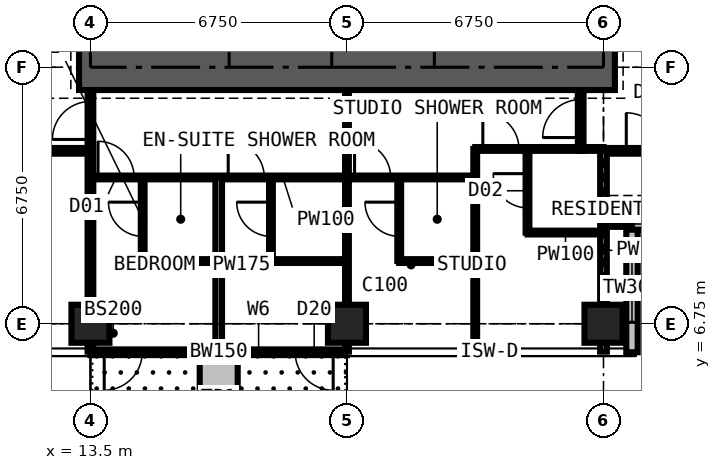
"""IFC4 building model, lengths in metres.
Left out: names, types, materials, properties, quantities, classifications, styles, units other than length and angle.
Written with IfcOpenShell. Run it as: python <this file> out.ifc"""

import sys

from ifc_helpers import new_model, si_unit, direction, frame, frame_2d, origin, origin_2d, place, context, subcontext, project, spatial, rectangle, extrude, element, fill, save


model = new_model("IFC4")
c1 = context("Model", 3, precision=1e-05, world=origin(), true_north=direction((0.0, 1.0)))
c2 = subcontext(c1, "Body", "Model", "MODEL_VIEW")
j1 = project(units=[si_unit("LENGTHUNIT", "METRE"), si_unit("PLANEANGLEUNIT", "RADIAN")], contexts=[c1])
p1 = place(None, origin())
s1 = spatial("IfcSite", under=j1, at=p1, CompositionType="ELEMENT")
p2 = place(p1, origin())
s2 = spatial("IfcBuilding", under=s1, at=p2, CompositionType="ELEMENT")
p3 = place(p2, frame((0.0, 0.0, 247.5)))
s3 = spatial("IfcBuildingStorey", under=s2, at=p3, CompositionType="ELEMENT", Elevation=247.5)
for number, where, z_axis, x_axis in (
    (1, (13.5, 6.75, 0.0), (0.0, 0.0, 1.0), (1.0, 0.0, 0.0)),
    (2, (20.25, 6.75, 0.0), (0.0, 0.0, 1.0), (1.0, 0.0, 0.0)),
    (3, (27.0, 6.75, 0.0), (0.0, 0.0, 1.0), (1.0, 0.0, 0.0)),
):
    element("IfcColumn", number, at=place(p3, frame(where, z_axis=z_axis, x_axis=x_axis)), inside=s3, PredefinedType="COLUMN", context=c2, shape_type="SweptSolid", body=[
        extrude(rectangle(XDim=1.0, YDim=1.0, at=origin_2d()), origin(), (0.0, 0.0, 1.0), 3.6),
    ])
p4 = place(p3, frame((13.2, 13.5, 0.0), z_axis=(0.0, 0.0, 1.0), x_axis=(1.0, 0.0, 0.0)))
e4 = element("IfcWall", 4, at=p4, inside=s3, PredefinedType="SHEAR", context=c2, shape_type="SweptSolid", body=[
    extrude(rectangle(XDim=14.1, YDim=1.2, at=frame_2d((7.05, 0.0))), origin(), (0.0, 0.0, 1.0), 3.6),
])
p5 = place(p3, frame((20.25, 6.0, 0.0), z_axis=(0.0, 0.0, 1.0), x_axis=(-1.0, 0.0, 0.0)))
e5 = element("IfcWall", 5, at=p5, inside=s3, PredefinedType="SOLIDWALL", context=c2, shape_type="SweptSolid", body=[
    extrude(rectangle(XDim=6.75, YDim=0.15, at=frame_2d((3.375, 0.0))), origin(), (0.0, 0.0, 1.0), 3.375),
])
p6 = place(p5, frame((0.363, 0.0, 0.0)))
e6 = element("IfcOpeningElement", 6, at=p6, cuts=e5, PredefinedType="OPENING", context=c2, shape_type="SweptSolid", body=[
    extrude(rectangle(XDim=1.0, YDim=2.2, at=frame_2d((0.5, 1.1))), frame((0.0, 0.085, 0.0), z_axis=(0.0, -1.0, 0.0), x_axis=(1.0, 0.0, 0.0)), (0.0, 0.0, 1.0), 0.17),
])
p7 = place(p5, frame((1.725, 0.0, 0.9)))
e7 = element("IfcOpeningElement", 7, at=p7, cuts=e5, PredefinedType="OPENING", context=c2, shape_type="SweptSolid", body=[
    extrude(rectangle(XDim=1.2, YDim=1.8, at=frame_2d((0.6, 0.9))), frame((0.0, 0.085, 0.0), z_axis=(0.0, -1.0, 0.0), x_axis=(1.0, 0.0, 0.0)), (0.0, 0.0, 1.0), 0.17),
])
p8 = place(p5, frame((5.387, 0.0, 0.0)))
e8 = element("IfcOpeningElement", 8, at=p8, cuts=e5, PredefinedType="OPENING", context=c2, shape_type="SweptSolid", body=[
    extrude(rectangle(XDim=1.0, YDim=2.2, at=frame_2d((0.5, 1.1))), frame((0.0, 0.085, 0.0), z_axis=(0.0, -1.0, 0.0), x_axis=(1.0, 0.0, 0.0)), (0.0, 0.0, 1.0), 0.17),
])
p9 = place(p5, frame((3.825, 0.0, 0.9)))
e9 = element("IfcOpeningElement", 9, at=p9, cuts=e5, PredefinedType="OPENING", context=c2, shape_type="SweptSolid", body=[
    extrude(rectangle(XDim=1.2, YDim=1.8, at=frame_2d((0.6, 0.9))), frame((0.0, 0.085, 0.0), z_axis=(0.0, -1.0, 0.0), x_axis=(1.0, 0.0, 0.0)), (0.0, 0.0, 1.0), 0.17),
])
p10 = place(p3, frame((27.75, 6.0, 0.0), z_axis=(0.0, 0.0, 1.0), x_axis=(0.0, 1.0, 0.0)))
e10 = element("IfcWall", 10, at=p10, inside=s3, PredefinedType="SOLIDWALL", context=c2, shape_type="SweptSolid", body=[
    extrude(rectangle(XDim=3.375, YDim=0.3, at=frame_2d((1.688, 0.0))), origin(), (0.0, 0.0, 1.0), 3.375),
])
p11 = place(p10, frame((0.788, 0.0, 0.6)))
e11 = element("IfcOpeningElement", 11, at=p11, cuts=e10, PredefinedType="OPENING", context=c2, shape_type="SweptSolid", body=[
    extrude(rectangle(XDim=1.8, YDim=2.1, at=frame_2d((0.9, 1.05))), frame((0.0, 0.16, 0.0), z_axis=(0.0, -1.0, 0.0), x_axis=(1.0, 0.0, 0.0)), (0.0, 0.0, 1.0), 0.32),
])
p12 = place(p3, frame((27.75, 9.375, 0.0), z_axis=(0.0, 0.0, 1.0), x_axis=(1.0, 0.0, 0.0)))
e12 = element("IfcWall", 12, at=p12, inside=s3, PredefinedType="SOLIDWALL", context=c2, shape_type="SweptSolid", body=[
    extrude(rectangle(XDim=3.375, YDim=0.3, at=frame_2d((1.688, 0.0))), origin(), (0.0, 0.0, 1.0), 3.375),
])
p13 = place(p12, frame((0.788, 0.0, 0.6)))
e13 = element("IfcOpeningElement", 13, at=p13, cuts=e12, PredefinedType="OPENING", context=c2, shape_type="SweptSolid", body=[
    extrude(rectangle(XDim=1.8, YDim=2.1, at=frame_2d((0.9, 1.05))), frame((0.0, 0.16, 0.0), z_axis=(0.0, -1.0, 0.0), x_axis=(1.0, 0.0, 0.0)), (0.0, 0.0, 1.0), 0.32),
])
p14 = place(p3, frame((16.875, 5.9, 0.0), z_axis=(0.0, 0.0, 1.0), x_axis=(0.0, -1.0, 0.0)))
e14 = element("IfcWall", 14, at=p14, inside=s3, PredefinedType="USERDEFINED", context=c2, shape_type="SweptSolid", body=[
    extrude(rectangle(XDim=2.2, YDim=1.0, at=frame_2d((1.1, 0.0))), origin(), (0.0, 0.0, 1.0), 0.9),
])
p15 = place(p3, frame((10.125, 11.3, 0.0), z_axis=(0.0, 0.0, 1.0), x_axis=(1.0, 0.0, 0.0)))
e15 = element("IfcWall", 15, at=p15, inside=s3, PredefinedType="PARTITIONING", context=c2, shape_type="SweptSolid", body=[
    extrude(rectangle(XDim=3.375, YDim=0.15, at=frame_2d((1.688, 0.0))), origin(), (0.0, 0.0, 1.0), 3.375),
])
p16 = place(p3, frame((13.5, 6.016, 0.0), z_axis=(0.0, 0.0, 1.0), x_axis=(0.0, 1.0, 0.0)))
e16 = element("IfcWall", 16, at=p16, inside=s3, PredefinedType="PARTITIONING", context=c2, shape_type="SweptSolid", body=[
    extrude(rectangle(XDim=6.884, YDim=0.15, at=frame_2d((3.442, 0.0))), origin(), (0.0, 0.0, 1.0), 2.61),
])
p17 = place(p16, frame((5.584, 0.0, 0.0)))
e17 = element("IfcOpeningElement", 17, at=p17, cuts=e16, PredefinedType="OPENING", context=c2, shape_type="SweptSolid", body=[
    extrude(rectangle(XDim=1.0, YDim=2.2, at=frame_2d((0.5, 1.1))), frame((0.0, 0.085, 0.0), z_axis=(0.0, -1.0, 0.0), x_axis=(1.0, 0.0, 0.0)), (0.0, 0.0, 1.0), 0.17),
])
p18 = place(p3, frame((13.5, 10.6, 0.0), z_axis=(0.0, 0.0, 1.0), x_axis=(1.0, 0.0, 0.0)))
e18 = element("IfcWall", 18, at=p18, inside=s3, PredefinedType="PARTITIONING", context=c2, shape_type="SweptSolid", body=[
    extrude(rectangle(XDim=10.125, YDim=0.1, at=frame_2d((5.062, 0.0))), origin(), (0.0, 0.0, 1.0), 3.375),
])
p19 = place(p18, frame((0.2, 0.0, 0.0)))
e19 = element("IfcOpeningElement", 19, at=p19, cuts=e18, PredefinedType="OPENING", context=c2, shape_type="SweptSolid", body=[
    extrude(rectangle(XDim=0.95, YDim=2.2, at=frame_2d((0.475, 1.1))), frame((0.0, 0.06, 0.0), z_axis=(0.0, -1.0, 0.0), x_axis=(1.0, 0.0, 0.0)), (0.0, 0.0, 1.0), 0.12),
])
p20 = place(p18, frame((3.625, 0.0, 0.0)))
e20 = element("IfcOpeningElement", 20, at=p20, cuts=e18, PredefinedType="OPENING", context=c2, shape_type="SweptSolid", body=[
    extrude(rectangle(XDim=0.95, YDim=2.2, at=frame_2d((0.475, 1.1))), frame((0.0, 0.06, 0.0), z_axis=(0.0, -1.0, 0.0), x_axis=(1.0, 0.0, 0.0)), (0.0, 0.0, 1.0), 0.12),
])
p21 = place(p18, frame((6.95, 0.0, 0.0)))
e21 = element("IfcOpeningElement", 21, at=p21, cuts=e18, PredefinedType="OPENING", context=c2, shape_type="SweptSolid", body=[
    extrude(rectangle(XDim=0.95, YDim=2.2, at=frame_2d((0.475, 1.1))), frame((0.0, 0.06, 0.0), z_axis=(0.0, -1.0, 0.0), x_axis=(1.0, 0.0, 0.0)), (0.0, 0.0, 1.0), 0.12),
])
p22 = place(p3, frame((14.875, 8.4, 0.0), z_axis=(0.0, 0.0, 1.0), x_axis=(0.0, 1.0, 0.0)))
e22 = element("IfcWall", 22, at=p22, inside=s3, PredefinedType="PARTITIONING", context=c2, shape_type="SweptSolid", body=[
    extrude(rectangle(XDim=2.2, YDim=0.1, at=frame_2d((1.1, 0.0))), origin(), (0.0, 0.0, 1.0), 3.375),
])
p23 = place(p22, frame((0.65, 0.0, 0.0)))
e23 = element("IfcOpeningElement", 23, at=p23, cuts=e22, PredefinedType="OPENING", context=c2, shape_type="SweptSolid", body=[
    extrude(rectangle(XDim=0.9, YDim=2.2, at=frame_2d((0.45, 1.1))), frame((0.0, 0.06, 0.0), z_axis=(0.0, -1.0, 0.0), x_axis=(1.0, 0.0, 0.0)), (0.0, 0.0, 1.0), 0.12),
])
p24 = place(p3, frame((14.875, 8.4, 0.0), z_axis=(0.0, 0.0, 1.0), x_axis=(1.0, 0.0, 0.0)))
e24 = element("IfcWall", 24, at=p24, inside=s3, PredefinedType="PARTITIONING", context=c2, shape_type="SweptSolid", body=[
    extrude(rectangle(XDim=2.0, YDim=0.1, at=frame_2d((1.0, 0.0))), origin(), (0.0, 0.0, 1.0), 3.375),
])
p25 = place(p3, frame((16.875, 6.016, 0.0), z_axis=(0.0, 0.0, 1.0), x_axis=(0.0, 1.0, 0.0)))
e25 = element("IfcWall", 25, at=p25, inside=s3, PredefinedType="PARTITIONING", context=c2, shape_type="SweptSolid", body=[
    extrude(rectangle(XDim=4.584, YDim=0.175, at=frame_2d((2.292, 0.0))), origin(), (0.0, 0.0, 1.0), 3.375),
])
p26 = place(p3, frame((18.25, 8.4, 0.0), z_axis=(0.0, 0.0, 1.0), x_axis=(0.0, 1.0, 0.0)))
e26 = element("IfcWall", 26, at=p26, inside=s3, PredefinedType="PARTITIONING", context=c2, shape_type="SweptSolid", body=[
    extrude(rectangle(XDim=2.2, YDim=0.1, at=frame_2d((1.1, 0.0))), origin(), (0.0, 0.0, 1.0), 3.375),
])
p27 = place(p26, frame((0.65, 0.0, 0.0)))
e27 = element("IfcOpeningElement", 27, at=p27, cuts=e26, PredefinedType="OPENING", context=c2, shape_type="SweptSolid", body=[
    extrude(rectangle(XDim=0.9, YDim=2.2, at=frame_2d((0.45, 1.1))), frame((0.0, 0.06, 0.0), z_axis=(0.0, -1.0, 0.0), x_axis=(1.0, 0.0, 0.0)), (0.0, 0.0, 1.0), 0.12),
])
p28 = place(p3, frame((18.25, 8.4, 0.0), z_axis=(0.0, 0.0, 1.0), x_axis=(1.0, 0.0, 0.0)))
e28 = element("IfcWall", 28, at=p28, inside=s3, PredefinedType="PARTITIONING", context=c2, shape_type="SweptSolid", body=[
    extrude(rectangle(XDim=2.0, YDim=0.1, at=frame_2d((1.0, 0.0))), origin(), (0.0, 0.0, 1.0), 3.375),
])
p29 = place(p3, frame((20.25, 6.016, 0.0), z_axis=(0.0, 0.0, 1.0), x_axis=(0.0, 1.0, 0.0)))
e29 = element("IfcWall", 29, at=p29, inside=s3, PredefinedType="PARTITIONING", context=c2, shape_type="SweptSolid", body=[
    extrude(rectangle(XDim=6.884, YDim=0.1, at=frame_2d((3.442, 0.0))), origin(), (0.0, 0.0, 1.0), 2.61),
])
p30 = place(p3, frame((21.625, 8.4, 0.0), z_axis=(0.0, 0.0, 1.0), x_axis=(0.0, 1.0, 0.0)))
e30 = element("IfcWall", 30, at=p30, inside=s3, PredefinedType="PARTITIONING", context=c2, shape_type="SweptSolid", body=[
    extrude(rectangle(XDim=2.2, YDim=0.1, at=frame_2d((1.1, 0.0))), origin(), (0.0, 0.0, 1.0), 3.375),
])
p31 = place(p30, frame((0.65, 0.0, 0.0)))
e31 = element("IfcOpeningElement", 31, at=p31, cuts=e30, PredefinedType="OPENING", context=c2, shape_type="SweptSolid", body=[
    extrude(rectangle(XDim=0.9, YDim=2.2, at=frame_2d((0.45, 1.1))), frame((0.0, 0.06, 0.0), z_axis=(0.0, -1.0, 0.0), x_axis=(1.0, 0.0, 0.0)), (0.0, 0.0, 1.0), 0.12),
])
p32 = place(p3, frame((21.625, 8.4, 0.0), z_axis=(0.0, 0.0, 1.0), x_axis=(1.0, 0.0, 0.0)))
e32 = element("IfcWall", 32, at=p32, inside=s3, PredefinedType="PARTITIONING", context=c2, shape_type="SweptSolid", body=[
    extrude(rectangle(XDim=2.0, YDim=0.1, at=frame_2d((1.0, 0.0))), origin(), (0.0, 0.0, 1.0), 3.375),
])
p33 = place(p3, frame((23.625, 6.016, 0.0), z_axis=(0.0, 0.0, 1.0), x_axis=(0.0, 1.0, 0.0)))
e33 = element("IfcWall", 33, at=p33, inside=s3, PredefinedType="PARTITIONING", context=c2, shape_type="SweptSolid", body=[
    extrude(rectangle(XDim=5.334, YDim=0.1, at=frame_2d((2.667, 0.0))), origin(), (0.0, 0.0, 1.0), 3.375),
])
p34 = place(p3, frame((23.625, 11.35, 0.0), z_axis=(0.0, 0.0, 1.0), x_axis=(1.0, 0.0, 0.0)))
e34 = element("IfcWall", 34, at=p34, inside=s3, PredefinedType="PARTITIONING", context=c2, shape_type="SweptSolid", body=[
    extrude(rectangle(XDim=3.375, YDim=0.1, at=frame_2d((1.688, 0.0))), origin(), (0.0, 0.0, 1.0), 3.375),
])
p35 = place(p34, frame((0.2, 0.0, 0.0)))
e35 = element("IfcOpeningElement", 35, at=p35, cuts=e34, PredefinedType="OPENING", context=c2, shape_type="SweptSolid", body=[
    extrude(rectangle(XDim=0.95, YDim=2.2, at=frame_2d((0.475, 1.1))), frame((0.0, 0.06, 0.0), z_axis=(0.0, -1.0, 0.0), x_axis=(1.0, 0.0, 0.0)), (0.0, 0.0, 1.0), 0.12),
])
p36 = place(p3, frame((25.0, 9.15, 0.0), z_axis=(0.0, 0.0, 1.0), x_axis=(0.0, 1.0, 0.0)))
e36 = element("IfcWall", 36, at=p36, inside=s3, PredefinedType="PARTITIONING", context=c2, shape_type="SweptSolid", body=[
    extrude(rectangle(XDim=2.2, YDim=0.1, at=frame_2d((1.1, 0.0))), origin(), (0.0, 0.0, 1.0), 3.375),
])
p37 = place(p36, frame((0.65, 0.0, 0.0)))
e37 = element("IfcOpeningElement", 37, at=p37, cuts=e36, PredefinedType="OPENING", context=c2, shape_type="SweptSolid", body=[
    extrude(rectangle(XDim=0.9, YDim=2.2, at=frame_2d((0.45, 1.1))), frame((0.0, 0.06, 0.0), z_axis=(0.0, -1.0, 0.0), x_axis=(1.0, 0.0, 0.0)), (0.0, 0.0, 1.0), 0.12),
])
p38 = place(p3, frame((25.0, 9.15, 0.0), z_axis=(0.0, 0.0, 1.0), x_axis=(1.0, 0.0, 0.0)))
e38 = element("IfcWall", 38, at=p38, inside=s3, PredefinedType="PARTITIONING", context=c2, shape_type="SweptSolid", body=[
    extrude(rectangle(XDim=2.0, YDim=0.1, at=frame_2d((1.0, 0.0))), origin(), (0.0, 0.0, 1.0), 3.375),
])
p39 = place(p3, frame((26.4, 11.3, 0.0), z_axis=(0.0, 0.0, 1.0), x_axis=(0.0, 1.0, 0.0)))
e39 = element("IfcWall", 39, at=p39, inside=s3, PredefinedType="PARTITIONING", context=c2, shape_type="SweptSolid", body=[
    extrude(rectangle(XDim=1.6, YDim=0.15, at=frame_2d((0.8, 0.0))), origin(), (0.0, 0.0, 1.0), 3.375),
])
p40 = place(p39, frame((0.35, 0.0, 0.0)))
e40 = element("IfcOpeningElement", 40, at=p40, cuts=e39, PredefinedType="OPENING", context=c2, shape_type="SweptSolid", body=[
    extrude(rectangle(XDim=1.0, YDim=2.2, at=frame_2d((0.5, 1.1))), frame((0.0, 0.085, 0.0), z_axis=(0.0, -1.0, 0.0), x_axis=(1.0, 0.0, 0.0)), (0.0, 0.0, 1.0), 0.17),
])
p41 = place(p3, frame((27.0, 11.3, 0.0), z_axis=(0.0, 0.0, 1.0), x_axis=(1.0, 0.0, 0.0)))
e41 = element("IfcWall", 41, at=p41, inside=s3, PredefinedType="PARTITIONING", context=c2, shape_type="SweptSolid", body=[
    extrude(rectangle(XDim=3.375, YDim=0.15, at=frame_2d((1.688, 0.0))), origin(), (0.0, 0.0, 1.0), 3.375),
])
p42 = place(p41, frame((0.6, 0.0, 0.0)))
e42 = element("IfcOpeningElement", 42, at=p42, cuts=e41, PredefinedType="OPENING", context=c2, shape_type="SweptSolid", body=[
    extrude(rectangle(XDim=1.0, YDim=2.2, at=frame_2d((0.5, 1.1))), frame((0.0, 0.085, 0.0), z_axis=(0.0, -1.0, 0.0), x_axis=(1.0, 0.0, 0.0)), (0.0, 0.0, 1.0), 0.17),
])
p43 = place(p3, frame((27.0, 6.016, 0.0), z_axis=(0.0, 0.0, 1.0), x_axis=(0.0, 1.0, 0.0)))
e43 = element("IfcWall", 43, at=p43, inside=s3, PredefinedType="PARTITIONING", context=c2, shape_type="SweptSolid", body=[
    extrude(rectangle(XDim=5.334, YDim=0.175, at=frame_2d((2.667, 0.0))), origin(), (0.0, 0.0, 1.0), 2.877),
])
p44 = place(p3, frame((27.0, 9.375, 0.0), z_axis=(0.0, 0.0, 1.0), x_axis=(1.0, 0.0, 0.0)))
e44 = element("IfcWall", 44, at=p44, inside=s3, PredefinedType="PARTITIONING", context=c2, shape_type="SweptSolid", body=[
    extrude(rectangle(XDim=0.734, YDim=0.15, at=frame_2d((0.367, 0.0))), origin(), (0.0, 0.0, 1.0), 3.375),
])
p45 = place(p6, origin())
e45 = element("IfcDoor", 45, at=p45, inside=s3, OperationType="SINGLE_SWING_LEFT", PredefinedType="DOOR", context=c2, shape_type="SweptSolid", body=[
    extrude(rectangle(XDim=1.0, YDim=2.2, at=frame_2d((0.5, 1.1))), frame((0.0, 0.025, 0.0), z_axis=(0.0, -1.0, 0.0), x_axis=(1.0, 0.0, 0.0)), (0.0, 0.0, 1.0), 0.05),
])
fill(e6, e45)
p46 = place(p7, origin())
e46 = element("IfcWindow", 46, at=p46, inside=s3, PartitioningType="SINGLE_PANEL", PredefinedType="WINDOW", context=c2, shape_type="SweptSolid", body=[
    extrude(rectangle(XDim=1.2, YDim=1.8, at=frame_2d((0.6, 0.9))), frame((0.0, 0.03, 0.0), z_axis=(0.0, -1.0, 0.0), x_axis=(1.0, 0.0, 0.0)), (0.0, 0.0, 1.0), 0.06),
])
fill(e7, e46)
p47 = place(p8, origin())
e47 = element("IfcDoor", 47, at=p47, inside=s3, OperationType="SINGLE_SWING_RIGHT", PredefinedType="DOOR", context=c2, shape_type="SweptSolid", body=[
    extrude(rectangle(XDim=1.0, YDim=2.2, at=frame_2d((0.5, 1.1))), frame((0.0, 0.025, 0.0), z_axis=(0.0, -1.0, 0.0), x_axis=(1.0, 0.0, 0.0)), (0.0, 0.0, 1.0), 0.05),
])
fill(e8, e47)
p48 = place(p9, origin())
e48 = element("IfcWindow", 48, at=p48, inside=s3, PartitioningType="SINGLE_PANEL", PredefinedType="WINDOW", context=c2, shape_type="SweptSolid", body=[
    extrude(rectangle(XDim=1.2, YDim=1.8, at=frame_2d((0.6, 0.9))), frame((0.0, 0.03, 0.0), z_axis=(0.0, -1.0, 0.0), x_axis=(1.0, 0.0, 0.0)), (0.0, 0.0, 1.0), 0.06),
])
fill(e9, e48)
p49 = place(p11, origin())
e49 = element("IfcWindow", 49, at=p49, inside=s3, PartitioningType="SINGLE_PANEL", PredefinedType="WINDOW", context=c2, shape_type="SweptSolid", body=[
    extrude(rectangle(XDim=1.8, YDim=2.1, at=frame_2d((0.9, 1.05))), frame((0.0, 0.03, 0.0), z_axis=(0.0, -1.0, 0.0), x_axis=(1.0, 0.0, 0.0)), (0.0, 0.0, 1.0), 0.06),
])
fill(e11, e49)
p50 = place(p19, origin())
e50 = element("IfcDoor", 50, at=p50, inside=s3, OperationType="SINGLE_SWING_LEFT", PredefinedType="DOOR", context=c2, shape_type="SweptSolid", body=[
    extrude(rectangle(XDim=0.95, YDim=2.2, at=frame_2d((0.475, 1.1))), frame((0.0, 0.025, 0.0), z_axis=(0.0, -1.0, 0.0), x_axis=(1.0, 0.0, 0.0)), (0.0, 0.0, 1.0), 0.05),
])
fill(e19, e50)
p51 = place(p23, origin())
e51 = element("IfcDoor", 51, at=p51, inside=s3, OperationType="SINGLE_SWING_RIGHT", PredefinedType="DOOR", context=c2, shape_type="SweptSolid", body=[
    extrude(rectangle(XDim=0.9, YDim=2.2, at=frame_2d((0.45, 1.1))), frame((0.0, 0.025, 0.0), z_axis=(0.0, -1.0, 0.0), x_axis=(1.0, 0.0, 0.0)), (0.0, 0.0, 1.0), 0.05),
])
fill(e23, e51)
p52 = place(p20, origin())
e52 = element("IfcDoor", 52, at=p52, inside=s3, OperationType="SINGLE_SWING_LEFT", PredefinedType="DOOR", context=c2, shape_type="SweptSolid", body=[
    extrude(rectangle(XDim=0.95, YDim=2.2, at=frame_2d((0.475, 1.1))), frame((0.0, 0.025, 0.0), z_axis=(0.0, -1.0, 0.0), x_axis=(1.0, 0.0, 0.0)), (0.0, 0.0, 1.0), 0.05),
])
fill(e20, e52)
p53 = place(p27, origin())
e53 = element("IfcDoor", 53, at=p53, inside=s3, OperationType="SINGLE_SWING_RIGHT", PredefinedType="DOOR", context=c2, shape_type="SweptSolid", body=[
    extrude(rectangle(XDim=0.9, YDim=2.2, at=frame_2d((0.45, 1.1))), frame((0.0, 0.025, 0.0), z_axis=(0.0, -1.0, 0.0), x_axis=(1.0, 0.0, 0.0)), (0.0, 0.0, 1.0), 0.05),
])
fill(e27, e53)
p54 = place(p17, origin())
e54 = element("IfcDoor", 54, at=p54, inside=s3, OperationType="SINGLE_SWING_LEFT", PredefinedType="DOOR", context=c2, shape_type="SweptSolid", body=[
    extrude(rectangle(XDim=1.0, YDim=2.2, at=frame_2d((0.5, 1.1))), frame((0.0, 0.025, 0.0), z_axis=(0.0, -1.0, 0.0), x_axis=(1.0, 0.0, 0.0)), (0.0, 0.0, 1.0), 0.05),
])
fill(e17, e54)
p55 = place(p21, origin())
e55 = element("IfcDoor", 55, at=p55, inside=s3, OperationType="SINGLE_SWING_LEFT", PredefinedType="DOOR", context=c2, shape_type="SweptSolid", body=[
    extrude(rectangle(XDim=0.95, YDim=2.2, at=frame_2d((0.475, 1.1))), frame((0.0, 0.025, 0.0), z_axis=(0.0, -1.0, 0.0), x_axis=(1.0, 0.0, 0.0)), (0.0, 0.0, 1.0), 0.05),
])
fill(e21, e55)
p56 = place(p31, origin())
e56 = element("IfcDoor", 56, at=p56, inside=s3, OperationType="SINGLE_SWING_RIGHT", PredefinedType="DOOR", context=c2, shape_type="SweptSolid", body=[
    extrude(rectangle(XDim=0.9, YDim=2.2, at=frame_2d((0.45, 1.1))), frame((0.0, 0.025, 0.0), z_axis=(0.0, -1.0, 0.0), x_axis=(1.0, 0.0, 0.0)), (0.0, 0.0, 1.0), 0.05),
])
fill(e31, e56)
p57 = place(p35, origin())
e57 = element("IfcDoor", 57, at=p57, inside=s3, OperationType="SINGLE_SWING_LEFT", PredefinedType="DOOR", context=c2, shape_type="SweptSolid", body=[
    extrude(rectangle(XDim=0.95, YDim=2.2, at=frame_2d((0.475, 1.1))), frame((0.0, 0.025, 0.0), z_axis=(0.0, -1.0, 0.0), x_axis=(1.0, 0.0, 0.0)), (0.0, 0.0, 1.0), 0.05),
])
fill(e35, e57)
p58 = place(p37, origin())
e58 = element("IfcDoor", 58, at=p58, inside=s3, OperationType="SINGLE_SWING_RIGHT", PredefinedType="DOOR", context=c2, shape_type="SweptSolid", body=[
    extrude(rectangle(XDim=0.9, YDim=2.2, at=frame_2d((0.45, 1.1))), frame((0.0, 0.025, 0.0), z_axis=(0.0, -1.0, 0.0), x_axis=(1.0, 0.0, 0.0)), (0.0, 0.0, 1.0), 0.05),
])
fill(e37, e58)
p59 = place(p42, origin())
e59 = element("IfcDoor", 59, at=p59, inside=s3, OperationType="SINGLE_SWING_LEFT", PredefinedType="DOOR", context=c2, shape_type="SweptSolid", body=[
    extrude(rectangle(XDim=1.0, YDim=2.2, at=frame_2d((0.5, 1.1))), frame((0.0, 0.025, 0.0), z_axis=(0.0, -1.0, 0.0), x_axis=(1.0, 0.0, 0.0)), (0.0, 0.0, 1.0), 0.05),
])
fill(e42, e59)
p60 = place(p40, origin())
e60 = element("IfcDoor", 60, at=p60, inside=s3, OperationType="SINGLE_SWING_LEFT", PredefinedType="DOOR", context=c2, shape_type="SweptSolid", body=[
    extrude(rectangle(XDim=1.0, YDim=2.2, at=frame_2d((0.5, 1.1))), frame((0.0, 0.025, 0.0), z_axis=(0.0, -1.0, 0.0), x_axis=(1.0, 0.0, 0.0)), (0.0, 0.0, 1.0), 0.05),
])
fill(e40, e60)
save(model, sys.argv[1])
